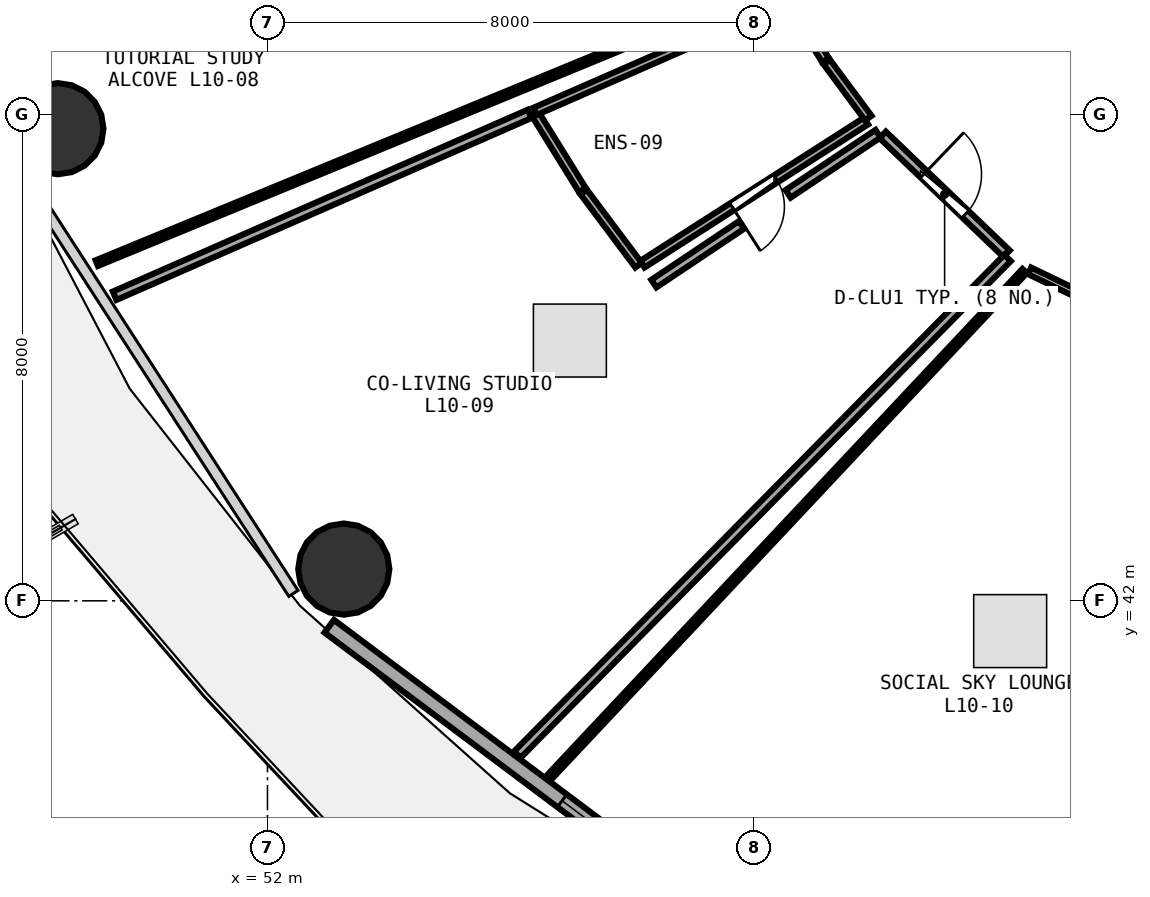
"""IFC4 building model, lengths in metres.
Left out: names, types, materials, properties, quantities, classifications, styles, units other than length and angle.
Written with IfcOpenShell. Run it as: python <this file> out.ifc"""

import sys

from ifc_helpers import new_model, si_unit, direction, frame, frame_2d, origin, origin_2d, place, context, subcontext, project, spatial, rectangle, circle, extrude, element, fill, save


model = new_model("IFC4")
c1 = context("Model", 3, precision=1e-05, world=origin(), true_north=direction((0.0, 1.0)))
c2 = subcontext(c1, "Body", "Model", "MODEL_VIEW")
j1 = project(units=[si_unit("LENGTHUNIT", "METRE"), si_unit("PLANEANGLEUNIT", "RADIAN")], contexts=[c1])
p1 = place(None, origin())
s1 = spatial("IfcSite", under=j1, at=p1, CompositionType="ELEMENT")
p2 = place(p1, origin())
s2 = spatial("IfcBuilding", under=s1, at=p2, CompositionType="ELEMENT")
p3 = place(p2, frame((0.0, 0.0, 41.25)))
s3 = spatial("IfcBuildingStorey", under=s2, at=p3, CompositionType="ELEMENT", Elevation=41.25)
for number, where, z_axis, x_axis in (
    (1, (48.553, 49.764, 0.0), (0.0, 0.0, 1.0), (1.0, 0.0, 0.0)),
    (2, (53.256, 42.522, 0.0), (0.0, 0.0, 1.0), (1.0, 0.0, 0.0)),
):
    element("IfcColumn", number, at=place(p3, frame(where, z_axis=z_axis, x_axis=x_axis)), inside=s3, PredefinedType="COLUMN", context=c2, shape_type="SweptSolid", body=[
        extrude(circle(Radius=0.75, at=origin_2d()), origin(), (0.0, 0.0, 1.0), 3.75),
    ])
p4 = place(p3, frame((53.016, 41.582, 0.0), z_axis=(0.0, 0.0, 1.0), x_axis=(0.80030733173, -0.599590005569, 0.0)))
e3 = element("IfcWall", 3, at=p4, inside=s3, PredefinedType="SOLIDWALL", context=c2, shape_type="SweptSolid", body=[
    extrude(rectangle(XDim=8.291, YDim=0.26, at=frame_2d((4.145, 0.0))), origin(), (0.0, 0.0, 1.0), 3.475),
])
p5 = place(p4, frame((4.785, 0.0, 0.85)))
e4 = element("IfcOpeningElement", 4, at=p5, cuts=e3, PredefinedType="OPENING", context=c2, shape_type="SweptSolid", body=[
    extrude(rectangle(XDim=1.6, YDim=1.45, at=frame_2d((0.8, 0.725))), frame((0.0, 0.14, 0.0), z_axis=(0.0, -1.0, 0.0), x_axis=(1.0, 0.0, 0.0)), (0.0, 0.0, 1.0), 0.28),
])
p6 = place(p3, frame((61.844, 49.89, 0.0), z_axis=(0.0, 0.0, 1.0), x_axis=(-0.842235862163, -0.539109221297, 0.0)))
e5 = element("IfcWall", 5, at=p6, inside=s3, PredefinedType="PLUMBINGWALL", context=c2, shape_type="SweptSolid", body=[
    extrude(rectangle(XDim=4.367, YDim=0.13, at=frame_2d((2.184, 0.0))), origin(), (0.0, 0.0, 1.0), 3.235),
])
p7 = place(p6, frame((1.754, 0.0, 0.0)))
e6 = element("IfcOpeningElement", 6, at=p7, cuts=e5, PredefinedType="OPENING", context=c2, shape_type="SweptSolid", body=[
    extrude(rectangle(XDim=0.86, YDim=2.05, at=frame_2d((0.43, 1.025))), frame((0.0, 0.075, 0.0), z_axis=(0.0, -1.0, 0.0), x_axis=(1.0, 0.0, 0.0)), (0.0, 0.0, 1.0), 0.15),
])
p8 = place(p3, frame((62.118, 49.663, 0.0), z_axis=(0.0, 0.0, 1.0), x_axis=(0.721698326825, -0.692207718144, 0.0)))
e7 = element("IfcWall", 7, at=p8, inside=s3, PredefinedType="PARTITIONING", context=c2, shape_type="SweptSolid", body=[
    extrude(rectangle(XDim=2.823, YDim=0.15, at=frame_2d((1.412, 0.0))), origin(), (0.0, 0.0, 1.0), 2.875),
])
p9 = place(p8, frame((0.936, 0.0, 0.0)))
e8 = element("IfcOpeningElement", 8, at=p9, cuts=e7, PredefinedType="OPENING", context=c2, shape_type="SweptSolid", body=[
    extrude(rectangle(XDim=0.95, YDim=2.08, at=frame_2d((0.475, 1.04))), frame((0.0, 0.085, 0.0), z_axis=(0.0, -1.0, 0.0), x_axis=(1.0, 0.0, 0.0)), (0.0, 0.0, 1.0), 0.17),
])
p10 = place(p3, frame((64.534, 47.427, 0.0), z_axis=(0.0, 0.0, 1.0), x_axis=(0.900751487373, -0.434334845477, 0.0)))
e9 = element("IfcWall", 9, at=p10, inside=s3, PredefinedType="PARTITIONING", context=c2, shape_type="SweptSolid", body=[
    extrude(rectangle(XDim=5.654, YDim=0.12, at=frame_2d((2.827, 0.0))), origin(), (0.0, 0.0, 1.0), 2.875),
])
p11 = place(p10, frame((2.377, 0.0, 0.0)))
e10 = element("IfcOpeningElement", 10, at=p11, cuts=e9, PredefinedType="OPENING", context=c2, shape_type="SweptSolid", body=[
    extrude(rectangle(XDim=0.9, YDim=2.08, at=frame_2d((0.45, 1.04))), frame((0.0, 0.07, 0.0), z_axis=(0.0, -1.0, 0.0), x_axis=(1.0, 0.0, 0.0)), (0.0, 0.0, 1.0), 0.14),
])
p12 = place(p3, frame((60.375, 52.16, 0.0), z_axis=(0.0, 0.0, 1.0), x_axis=(-0.924608681042, -0.380918346817, 0.0)))
e11 = element("IfcWall", 11, at=p12, inside=s3, PredefinedType="PARTITIONING", context=c2, shape_type="SweptSolid", body=[
    extrude(rectangle(XDim=12.094, YDim=0.1, at=frame_2d((6.047, 0.0))), origin(), (0.0, 0.0, 1.0), 2.875),
])
p13 = place(p3, frame((60.583, 51.859, 0.0), z_axis=(0.0, 0.0, 1.0), x_axis=(0.52310141153, -0.852270446077, 0.0)))
e12 = element("IfcWall", 12, at=p13, inside=s3, PredefinedType="PLUMBINGWALL", context=c2, shape_type="SweptSolid", body=[
    extrude(rectangle(XDim=1.135, YDim=0.13, at=frame_2d((0.568, 0.0))), origin(), (0.0, 0.0, 1.0), 3.48),
])
p14 = place(p3, frame((61.2, 50.858, 0.0), z_axis=(0.0, 0.0, 1.0), x_axis=(0.595625136946, -0.803262532574, 0.0)))
e13 = element("IfcWall", 13, at=p14, inside=s3, PredefinedType="PLUMBINGWALL", context=c2, shape_type="SweptSolid", body=[
    extrude(rectangle(XDim=1.145, YDim=0.13, at=frame_2d((0.573, 0.0))), origin(), (0.0, 0.0, 1.0), 2.875),
])
p15 = place(p3, frame((58.103, 47.519, 0.0), z_axis=(0.0, 0.0, 1.0), x_axis=(-0.599662382917, 0.800253101533, 0.0)))
e14 = element("IfcWall", 14, at=p15, inside=s3, PredefinedType="PLUMBINGWALL", context=c2, shape_type="SweptSolid", body=[
    extrude(rectangle(XDim=1.504, YDim=0.13, at=frame_2d((0.752, 0.0))), origin(), (0.0, 0.0, 1.0), 3.48),
])
p16 = place(p3, frame((57.178, 48.756, 0.0), z_axis=(0.0, 0.0, 1.0), x_axis=(-0.526861637299, 0.849951066323, 0.0)))
e15 = element("IfcWall", 15, at=p16, inside=s3, PredefinedType="PLUMBINGWALL", context=c2, shape_type="SweptSolid", body=[
    extrude(rectangle(XDim=1.492, YDim=0.13, at=frame_2d((0.746, 0.0))), origin(), (0.0, 0.0, 1.0), 3.48),
])
p17 = place(p3, frame((56.4, 50.049, 0.0), z_axis=(0.0, 0.0, 1.0), x_axis=(0.91604857307, 0.401067340701, 0.0)))
e16 = element("IfcWall", 16, at=p17, inside=s3, PredefinedType="PLUMBINGWALL", context=c2, shape_type="SweptSolid", body=[
    extrude(rectangle(XDim=4.535, YDim=0.13, at=frame_2d((2.268, 0.0))), origin(), (0.0, 0.0, 1.0), 2.875),
])
p18 = place(p3, frame((64.171, 47.638, 0.0), z_axis=(0.0, 0.0, 1.0), x_axis=(-0.702465266663, -0.711718026421, 0.0)))
e17 = element("IfcWall", 17, at=p18, inside=s3, PredefinedType="PARTITIONING", context=c2, shape_type="SweptSolid", body=[
    extrude(rectangle(XDim=11.478, YDim=0.15, at=frame_2d((5.739, 0.0))), origin(), (0.0, 0.0, 1.0), 2.875),
])
p19 = place(p3, frame((49.487, 47.017, 0.0), z_axis=(0.0, 0.0, 1.0), x_axis=(0.915920983282, 0.401358633124, 0.0)))
e18 = element("IfcWall", 18, at=p19, inside=s3, PredefinedType="PARTITIONING", context=c2, shape_type="SweptSolid", body=[
    extrude(rectangle(XDim=7.449, YDim=0.15, at=frame_2d((3.725, 0.0))), origin(), (0.0, 0.0, 1.0), 2.875),
])
p20 = place(p3, frame((58.354, 47.216, 0.0), z_axis=(0.0, 0.0, 1.0), x_axis=(0.831292382958, 0.555835383937, 0.0)))
e19 = element("IfcWall", 19, at=p20, inside=s3, PredefinedType="PARTITIONING", context=c2, shape_type="SweptSolid", body=[
    extrude(rectangle(XDim=1.736, YDim=0.15, at=frame_2d((0.868, 0.0))), origin(), (0.0, 0.0, 1.0), 3.48),
])
p21 = place(p3, frame((60.563, 48.693, 0.0), z_axis=(0.0, 0.0, 1.0), x_axis=(0.831268380724, 0.555871279352, 0.0)))
e20 = element("IfcWall", 20, at=p21, inside=s3, PredefinedType="PARTITIONING", context=c2, shape_type="SweptSolid", body=[
    extrude(rectangle(XDim=1.779, YDim=0.15, at=frame_2d((0.89, 0.0))), origin(), (0.0, 0.0, 1.0), 3.235),
])
p22 = place(p3, frame((56.622, 39.085, 0.0), z_axis=(0.0, 0.0, 1.0), x_axis=(0.684539394854, 0.728975868526, 0.0)))
e21 = element("IfcWall", 21, at=p22, inside=s3, PredefinedType="PARTITIONING", context=c2, shape_type="SweptSolid", body=[
    extrude(rectangle(XDim=11.439, YDim=0.1, at=frame_2d((5.719, 0.0))), origin(), (0.0, 0.0, 1.0), 2.875),
])
p23 = place(p5, origin())
e22 = element("IfcWindow", 22, at=p23, inside=s3, PartitioningType="SINGLE_PANEL", PredefinedType="WINDOW", context=c2, shape_type="SweptSolid", body=[
    extrude(rectangle(XDim=1.6, YDim=1.45, at=frame_2d((0.8, 0.725))), frame((0.0, 0.03, 0.0), z_axis=(0.0, -1.0, 0.0), x_axis=(1.0, 0.0, 0.0)), (0.0, 0.0, 1.0), 0.06),
])
fill(e4, e22)
p24 = place(p7, origin())
e23 = element("IfcDoor", 23, at=p24, inside=s3, OperationType="SINGLE_SWING_RIGHT", PredefinedType="DOOR", context=c2, shape_type="SweptSolid", body=[
    extrude(rectangle(XDim=0.86, YDim=2.05, at=frame_2d((0.43, 1.025))), frame((0.0, 0.025, 0.0), z_axis=(0.0, -1.0, 0.0), x_axis=(1.0, 0.0, 0.0)), (0.0, 0.0, 1.0), 0.05),
])
fill(e6, e23)
p25 = place(p9, origin())
e24 = element("IfcDoor", 24, at=p25, inside=s3, OperationType="SINGLE_SWING_LEFT", PredefinedType="DOOR", context=c2, shape_type="SweptSolid", body=[
    extrude(rectangle(XDim=0.95, YDim=2.08, at=frame_2d((0.475, 1.04))), frame((0.0, 0.025, 0.0), z_axis=(0.0, -1.0, 0.0), x_axis=(1.0, 0.0, 0.0)), (0.0, 0.0, 1.0), 0.05),
])
fill(e8, e24)
save(model, sys.argv[1])
